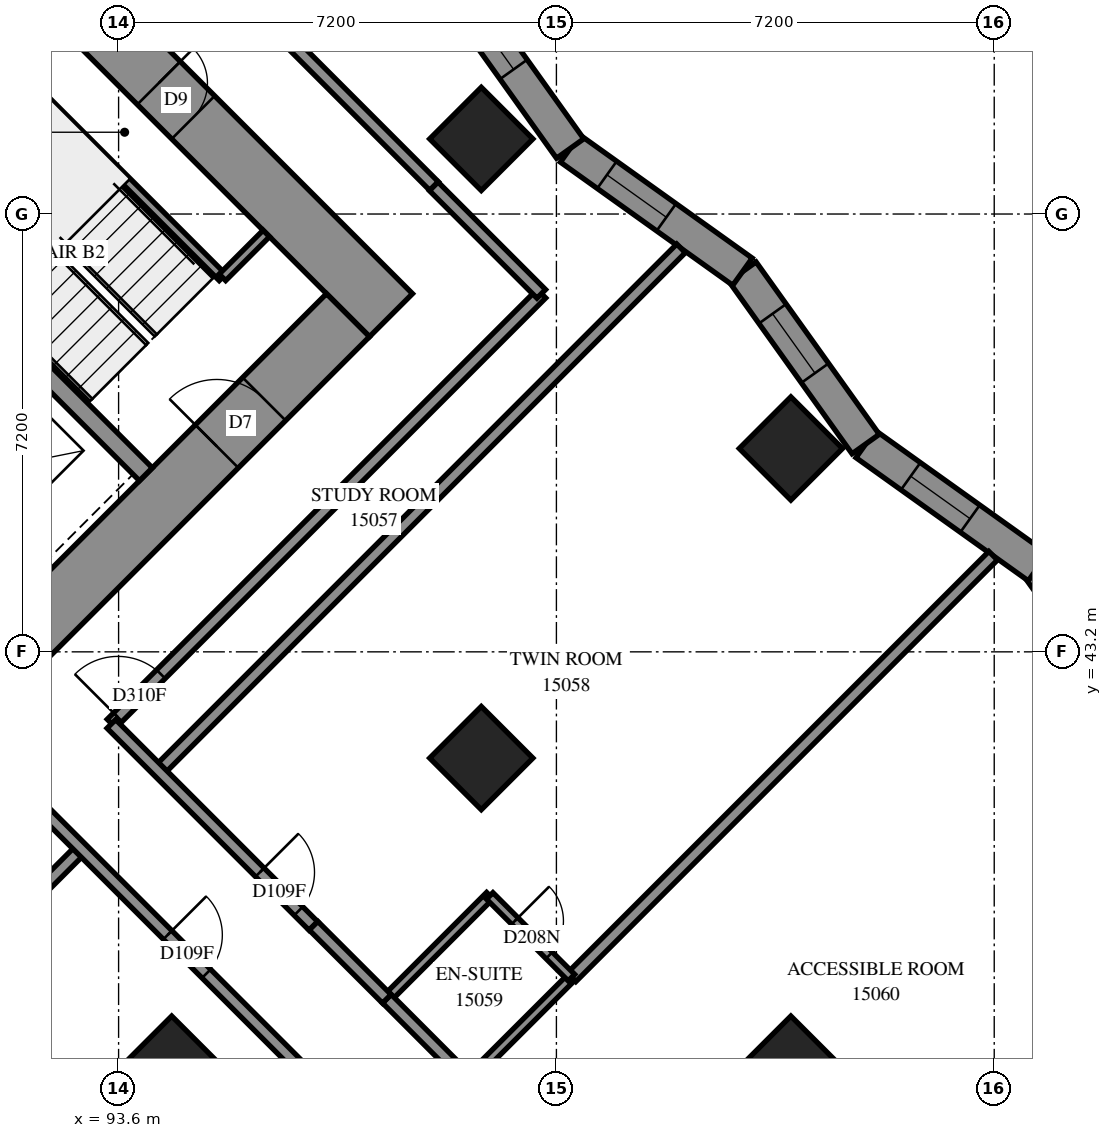
"""IFC4 building model, lengths in metres.
Left out: names, types, materials, properties, quantities, classifications, styles, units other than length and angle.
Written with IfcOpenShell. Run it as: python <this file> out.ifc"""

import sys

from ifc_helpers import new_model, si_unit, direction, frame, frame_2d, origin, origin_2d, place, context, subcontext, project, spatial, polyline, rectangle, outline, extrude, element, fill, save


model = new_model("IFC4")
c1 = context("Model", 3, precision=1e-05, world=origin(), true_north=direction((0.0, 1.0)))
c2 = subcontext(c1, "Body", "Model", "MODEL_VIEW")
j1 = project(units=[si_unit("LENGTHUNIT", "METRE"), si_unit("PLANEANGLEUNIT", "RADIAN")], contexts=[c1])
p1 = place(None, origin())
s1 = spatial("IfcSite", under=j1, at=p1, CompositionType="ELEMENT")
p2 = place(p1, origin())
s2 = spatial("IfcBuilding", under=s1, at=p2, CompositionType="ELEMENT")
p3 = place(p2, frame((0.0, 0.0, 57.6)))
s3 = spatial("IfcBuildingStorey", under=s2, at=p3, CompositionType="ELEMENT", Elevation=57.6)
for number, where, z_axis, x_axis in (
    (1, (99.565, 51.635, 0.0), (0.0, 0.0, 1.0), (0.707, -0.707, 0.0)),
    (2, (104.656, 46.544, 0.0), (0.0, 0.0, 1.0), (0.707, -0.707, 0.0)),
    (3, (99.565, 41.453, 0.0), (0.0, 0.0, 1.0), (0.707, -0.707, 0.0)),
    (4, (94.474, 36.362, 0.0), (0.0, 0.0, 1.0), (0.707, -0.707, 0.0)),
    (5, (104.656, 36.362, 0.0), (0.0, 0.0, 1.0), (0.707, -0.707, 0.0)),
):
    element("IfcColumn", number, at=place(p3, frame(where, z_axis=z_axis, x_axis=x_axis)), inside=s3, PredefinedType="COLUMN", context=c2, shape_type="SweptSolid", body=[
        extrude(rectangle(XDim=1.2, YDim=1.2, at=origin_2d()), origin(), (0.0, 0.0, 1.0), 3.1),
    ])
p4 = place(p3, frame((86.483, 60.333, -0.3), z_axis=(0.0, 0.0, 1.0), x_axis=(0.70710983, -0.7071037324, 0.0)))
e6 = element("IfcWall", 6, at=p4, inside=s3, PredefinedType="SHEAR", context=c2, shape_type="SweptSolid", body=[
    extrude(rectangle(XDim=16.4, YDim=1.0, at=frame_2d((8.2, 0.0))), origin(), (0.0, 0.0, 1.0), 2.7),
])
p5 = place(p4, frame((11.0, 0.0, 0.3)))
e7 = element("IfcOpeningElement", 7, at=p5, cuts=e6, PredefinedType="OPENING", context=c2, shape_type="SweptSolid", body=[
    extrude(rectangle(XDim=0.8, YDim=2.1, at=frame_2d((0.4, 1.05))), frame((0.0, 0.51, 0.0), z_axis=(0.0, -1.0, 0.0), x_axis=(1.0, 0.0, 0.0)), (0.0, 0.0, 1.0), 1.02),
])
p6 = place(p3, frame((87.19, 38.554, -0.3), z_axis=(0.0, 0.0, 1.0), x_axis=(0.707103309, 0.7071102534, 0.0)))
e8 = element("IfcWall", 8, at=p6, inside=s3, PredefinedType="SHEAR", context=c2, shape_type="SweptSolid", body=[
    extrude(rectangle(XDim=14.4, YDim=1.0, at=frame_2d((7.2, 0.0))), origin(), (0.0, 0.0, 1.0), 2.7),
])
p7 = place(p6, frame((4.55, 0.0, 0.3)))
e9 = element("IfcOpeningElement", 9, at=p7, cuts=e8, PredefinedType="OPENING", context=c2, shape_type="SweptSolid", body=[
    extrude(rectangle(XDim=1.1, YDim=2.1, at=frame_2d((0.55, 1.05))), frame((0.0, 0.51, 0.0), z_axis=(0.0, -1.0, 0.0), x_axis=(1.0, 0.0, 0.0)), (0.0, 0.0, 1.0), 1.02),
])
p8 = place(p6, frame((11.35, 0.0, 0.3)))
e10 = element("IfcOpeningElement", 10, at=p8, cuts=e8, PredefinedType="OPENING", context=c2, shape_type="SweptSolid", body=[
    extrude(rectangle(XDim=1.1, YDim=2.1, at=frame_2d((0.55, 1.05))), frame((0.0, 0.51, 0.0), z_axis=(0.0, -1.0, 0.0), x_axis=(1.0, 0.0, 0.0)), (0.0, 0.0, 1.0), 1.02),
])
p9 = place(p3, frame((88.958, 51.211, 0.0), z_axis=(0.0, 0.0, 1.0), x_axis=(0.7070998367, -0.7071137256, 0.0)))
e11 = element("IfcWall", 11, at=p9, inside=s3, PredefinedType="SOLIDWALL", context=c2, shape_type="SweptSolid", body=[
    extrude(rectangle(XDim=7.2, YDim=0.3, at=frame_2d((3.6, 0.0))), origin(), (0.0, 0.0, 1.0), 3.1),
])
p10 = place(p3, frame((110.745, 41.757, 0.0), z_axis=(0.0, 0.0, 1.0), x_axis=(-0.5813956737, 0.8136209625, 0.0)))
e12 = element("IfcWall", 12, at=p10, inside=s3, PredefinedType="SOLIDWALL", context=c2, shape_type="SweptSolid", body=[
    extrude(outline(polyline([(0.046, -0.275), (3.53, -0.275), (3.438, 0.275), (-0.046, 0.275), (0.046, -0.275)])), origin(), (0.0, 0.0, 1.0), 3.1),
])
p11 = place(p10, frame((1.268, 0.0, 0.5)))
e13 = element("IfcOpeningElement", 13, at=p11, cuts=e12, PredefinedType="OPENING", context=c2, shape_type="SweptSolid", body=[
    extrude(rectangle(XDim=1.2, YDim=2.45, at=frame_2d((0.6, 1.225))), frame((0.0, 0.285, 0.0), z_axis=(0.0, -1.0, 0.0), x_axis=(1.0, 0.0, 0.0)), (0.0, 0.0, 1.0), 0.57),
])
p12 = place(p3, frame((108.72, 44.592, 0.0), z_axis=(0.0, 0.0, 1.0), x_axis=(-0.8136209625, 0.5813956737, 0.0)))
e14 = element("IfcWall", 14, at=p12, inside=s3, PredefinedType="SOLIDWALL", context=c2, shape_type="SweptSolid", body=[
    extrude(outline(polyline([(-0.046, -0.275), (3.438, -0.275), (3.53, 0.275), (0.046, 0.275), (-0.046, -0.275)])), origin(), (0.0, 0.0, 1.0), 3.1),
])
p13 = place(p12, frame((1.373, 0.0, 0.5)))
e15 = element("IfcOpeningElement", 15, at=p13, cuts=e14, PredefinedType="OPENING", context=c2, shape_type="SweptSolid", body=[
    extrude(rectangle(XDim=1.2, YDim=2.45, at=frame_2d((0.6, 1.225))), frame((0.0, 0.285, 0.0), z_axis=(0.0, -1.0, 0.0), x_axis=(1.0, 0.0, 0.0)), (0.0, 0.0, 1.0), 0.57),
])
p14 = place(p3, frame((105.886, 46.617, 0.0), z_axis=(0.0, 0.0, 1.0), x_axis=(-0.5813956737, 0.8136209625, 0.0)))
e16 = element("IfcWall", 16, at=p14, inside=s3, PredefinedType="SOLIDWALL", context=c2, shape_type="SweptSolid", body=[
    extrude(outline(polyline([(0.046, -0.275), (3.53, -0.275), (3.438, 0.275), (-0.046, 0.275), (0.046, -0.275)])), origin(), (0.0, 0.0, 1.0), 3.1),
])
p15 = place(p14, frame((1.434, 0.0, 0.5)))
e17 = element("IfcOpeningElement", 17, at=p15, cuts=e16, PredefinedType="OPENING", context=c2, shape_type="SweptSolid", body=[
    extrude(rectangle(XDim=1.2, YDim=2.45, at=frame_2d((0.6, 1.225))), frame((0.0, 0.285, 0.0), z_axis=(0.0, -1.0, 0.0), x_axis=(1.0, 0.0, 0.0)), (0.0, 0.0, 1.0), 0.57),
])
p16 = place(p3, frame((103.86, 49.452, 0.0), z_axis=(0.0, 0.0, 1.0), x_axis=(-0.8136209625, 0.5813956737, 0.0)))
e18 = element("IfcWall", 18, at=p16, inside=s3, PredefinedType="SOLIDWALL", context=c2, shape_type="SweptSolid", body=[
    extrude(outline(polyline([(-0.046, -0.275), (3.438, -0.275), (3.53, 0.275), (0.046, 0.275), (-0.046, -0.275)])), origin(), (0.0, 0.0, 1.0), 3.1),
])
p17 = place(p16, frame((1.539, 0.0, 0.5)))
e19 = element("IfcOpeningElement", 19, at=p17, cuts=e18, PredefinedType="OPENING", context=c2, shape_type="SweptSolid", body=[
    extrude(rectangle(XDim=1.2, YDim=2.45, at=frame_2d((0.6, 1.225))), frame((0.0, 0.285, 0.0), z_axis=(0.0, -1.0, 0.0), x_axis=(1.0, 0.0, 0.0)), (0.0, 0.0, 1.0), 0.57),
])
p18 = place(p3, frame((101.026, 51.477, 0.0), z_axis=(0.0, 0.0, 1.0), x_axis=(-0.5813956737, 0.8136209625, 0.0)))
e20 = element("IfcWall", 20, at=p18, inside=s3, PredefinedType="SOLIDWALL", context=c2, shape_type="SweptSolid", body=[
    extrude(outline(polyline([(0.046, -0.275), (3.53, -0.275), (3.438, 0.275), (-0.046, 0.275), (0.046, -0.275)])), origin(), (0.0, 0.0, 1.0), 3.1),
])
p19 = place(p18, frame((1.599, 0.0, 0.5)))
e21 = element("IfcOpeningElement", 21, at=p19, cuts=e20, PredefinedType="OPENING", context=c2, shape_type="SweptSolid", body=[
    extrude(rectangle(XDim=1.2, YDim=2.45, at=frame_2d((0.6, 1.225))), frame((0.0, 0.285, 0.0), z_axis=(0.0, -1.0, 0.0), x_axis=(1.0, 0.0, 0.0)), (0.0, 0.0, 1.0), 0.57),
])
p20 = place(p3, frame((91.313, 53.354, 0.0), z_axis=(0.0, 0.0, 1.0), x_axis=(0.7071067812, -0.7071067812, 0.0)))
e22 = element("IfcWall", 22, at=p20, inside=s3, PredefinedType="PARTITIONING", context=c2, shape_type="SweptSolid", body=[
    extrude(rectangle(XDim=5.65, YDim=0.15, at=frame_2d((2.825, 0.0))), origin(), (0.0, 0.0, 1.0), 3.1),
])
p21 = place(p3, frame((95.308, 49.358, 0.0), z_axis=(0.0, 0.0, 1.0), x_axis=(0.70705776, 0.707155799, 0.0)))
e23 = element("IfcWall", 23, at=p21, inside=s3, PredefinedType="PARTITIONING", context=c2, shape_type="SweptSolid", body=[
    extrude(rectangle(XDim=1.02, YDim=0.15, at=frame_2d((0.51, 0.0))), origin(), (0.0, 0.0, 1.0), 3.1),
])
p22 = place(p3, frame((94.259, 41.243, 0.0), z_axis=(0.0, 0.0, 1.0), x_axis=(0.7070203602, 0.7071931916, 0.0)))
e24 = element("IfcWall", 24, at=p22, inside=s3, PredefinedType="PARTITIONING", context=c2, shape_type="SweptSolid", body=[
    extrude(rectangle(XDim=12.151, YDim=0.2, at=frame_2d((6.075, 0.0))), origin(), (0.0, 0.0, 1.0), 3.1),
])
p23 = place(p3, frame((93.484, 42.02, 0.0), z_axis=(0.0, 0.0, 1.0), x_axis=(0.7071067812, 0.7071067812, 0.0)))
e25 = element("IfcWall", 25, at=p23, inside=s3, PredefinedType="PARTITIONING", context=c2, shape_type="SweptSolid", body=[
    extrude(rectangle(XDim=9.998, YDim=0.2, at=frame_2d((4.999, 0.0))), origin(), (0.0, 0.0, 1.0), 3.1),
])
p24 = place(p23, frame((0.148, 0.0, 0.0)))
e26 = element("IfcOpeningElement", 26, at=p24, cuts=e25, PredefinedType="OPENING", context=c2, shape_type="SweptSolid", body=[
    extrude(rectangle(XDim=1.0, YDim=2.1, at=frame_2d((0.5, 1.05))), frame((0.0, 0.11, 0.0), z_axis=(0.0, -1.0, 0.0), x_axis=(1.0, 0.0, 0.0)), (0.0, 0.0, 1.0), 0.22),
])
p25 = place(p3, frame((106.14, 32.756, 0.0), z_axis=(0.0, 0.0, 1.0), x_axis=(0.7071067812, 0.7071067812, 0.0)))
e27 = element("IfcWall", 27, at=p25, inside=s3, PredefinedType="PARTITIONING", context=c2, shape_type="SweptSolid", body=[
    extrude(rectangle(XDim=9.86, YDim=0.2, at=frame_2d((4.93, 0.0))), origin(), (0.0, 0.0, 1.0), 3.1),
])
p26 = place(p3, frame((101.049, 37.847, 0.0), z_axis=(0.0, 0.0, 1.0), x_axis=(0.7071067812, 0.7071067812, 0.0)))
e28 = element("IfcWall", 28, at=p26, inside=s3, PredefinedType="PARTITIONING", context=c2, shape_type="SweptSolid", body=[
    extrude(rectangle(XDim=9.806, YDim=0.2, at=frame_2d((4.903, 0.0))), origin(), (0.0, 0.0, 1.0), 3.1),
])
p27 = place(p3, frame((86.314, 33.285, 0.0), z_axis=(0.0, 0.0, 1.0), x_axis=(0.7069956063, 0.7072179386, 0.0)))
e29 = element("IfcWall", 29, at=p27, inside=s3, PredefinedType="PARTITIONING", context=c2, shape_type="SweptSolid", body=[
    extrude(rectangle(XDim=9.445, YDim=0.2, at=frame_2d((4.723, 0.0))), origin(), (0.0, 0.0, 1.0), 3.1),
])
p28 = place(p3, frame((92.349, 40.601, 0.0), z_axis=(0.0, 0.0, 1.0), x_axis=(0.7071067812, -0.7071067812, 0.0)))
e30 = element("IfcWall", 30, at=p28, inside=s3, PredefinedType="PARTITIONING", context=c2, shape_type="SweptSolid", body=[
    extrude(rectangle(XDim=8.101, YDim=0.2, at=frame_2d((4.05, 0.0))), origin(), (0.0, 0.0, 1.0), 3.1),
])
p29 = place(p28, frame((2.909, 0.0, 0.0)))
e31 = element("IfcOpeningElement", 31, at=p29, cuts=e30, PredefinedType="OPENING", context=c2, shape_type="SweptSolid", body=[
    extrude(rectangle(XDim=0.9, YDim=2.1, at=frame_2d((0.45, 1.05))), frame((0.0, 0.11, 0.0), z_axis=(0.0, -1.0, 0.0), x_axis=(1.0, 0.0, 0.0)), (0.0, 0.0, 1.0), 0.22),
])
p30 = place(p3, frame((93.481, 42.015, 0.0), z_axis=(0.0, 0.0, 1.0), x_axis=(0.7071067812, -0.7071067812, 0.0)))
e32 = element("IfcWall", 32, at=p30, inside=s3, PredefinedType="PARTITIONING", context=c2, shape_type="SweptSolid", body=[
    extrude(rectangle(XDim=4.698, YDim=0.2, at=frame_2d((2.349, 0.0))), origin(), (0.0, 0.0, 1.0), 3.1),
])
p31 = place(p30, frame((3.452, 0.0, 0.0)))
e33 = element("IfcOpeningElement", 33, at=p31, cuts=e32, PredefinedType="OPENING", context=c2, shape_type="SweptSolid", body=[
    extrude(rectangle(XDim=0.9, YDim=2.1, at=frame_2d((0.45, 1.05))), frame((0.0, 0.11, 0.0), z_axis=(0.0, -1.0, 0.0), x_axis=(1.0, 0.0, 0.0)), (0.0, 0.0, 1.0), 0.22),
])
p32 = place(p3, frame((96.244, 53.406, 0.0), z_axis=(0.0, 0.0, 1.0), x_axis=(0.7068288851, -0.7073845681, 0.0)))
e34 = element("IfcWall", 34, at=p32, inside=s3, PredefinedType="PARTITIONING", context=c2, shape_type="SweptSolid", body=[
    extrude(rectangle(XDim=3.599, YDim=0.2, at=frame_2d((1.8, 0.0))), origin(), (0.0, 0.0, 1.0), 3.1),
])
p33 = place(p3, frame((98.783, 50.855, 0.0), z_axis=(0.0, 0.0, 1.0), x_axis=(0.7071067812, -0.7071067812, 0.0)))
e35 = element("IfcWall", 35, at=p33, inside=s3, PredefinedType="PARTITIONING", context=c2, shape_type="SweptSolid", body=[
    extrude(rectangle(XDim=2.5, YDim=0.2, at=frame_2d((1.25, 0.0))), origin(), (0.0, 0.0, 1.0), 3.1),
])
p34 = place(p3, frame((99.349, 36.153, 0.0), z_axis=(0.0, 0.0, 1.0), x_axis=(0.7075233388, 0.706689978, 0.0)))
e36 = element("IfcWall", 36, at=p34, inside=s3, PredefinedType="PARTITIONING", context=c2, shape_type="SweptSolid", body=[
    extrude(rectangle(XDim=2.4, YDim=0.15, at=frame_2d((1.2, 0.0))), origin(), (0.0, 0.0, 1.0), 3.1),
])
p35 = place(p3, frame((98.009, 37.495, 0.0), z_axis=(0.0, 0.0, 1.0), x_axis=(0.7071067812, 0.7071067812, 0.0)))
e37 = element("IfcWall", 37, at=p35, inside=s3, PredefinedType="PARTITIONING", context=c2, shape_type="SweptSolid", body=[
    extrude(rectangle(XDim=2.398, YDim=0.15, at=frame_2d((1.199, 0.0))), origin(), (0.0, 0.0, 1.0), 3.1),
])
p36 = place(p3, frame((99.703, 39.187, 0.0), z_axis=(0.0, 0.0, 1.0), x_axis=(0.7071067812, -0.7071067812, 0.0)))
e38 = element("IfcWall", 38, at=p36, inside=s3, PredefinedType="PARTITIONING", context=c2, shape_type="SweptSolid", body=[
    extrude(rectangle(XDim=1.901, YDim=0.15, at=frame_2d((0.95, 0.0))), origin(), (0.0, 0.0, 1.0), 3.1),
])
p37 = place(p36, frame((0.584, 0.0, 0.0)))
e39 = element("IfcOpeningElement", 39, at=p37, cuts=e38, PredefinedType="OPENING", context=c2, shape_type="SweptSolid", body=[
    extrude(rectangle(XDim=0.8, YDim=2.1, at=frame_2d((0.4, 1.05))), frame((0.0, 0.085, 0.0), z_axis=(0.0, -1.0, 0.0), x_axis=(1.0, 0.0, 0.0)), (0.0, 0.0, 1.0), 0.17),
])
p38 = place(p3, frame((98.012, 37.496, 0.0), z_axis=(0.0, 0.0, 1.0), x_axis=(0.7065800724, -0.7076330979, 0.0)))
e40 = element("IfcWall", 40, at=p38, inside=s3, PredefinedType="PARTITIONING", context=c2, shape_type="SweptSolid", body=[
    extrude(rectangle(XDim=1.899, YDim=0.2, at=frame_2d((0.95, 0.0))), origin(), (0.0, 0.0, 1.0), 3.1),
])
p39 = place(p3, frame((96.806, 38.696, 0.0), z_axis=(0.0, 0.0, 1.0), x_axis=(0.7076943229, -0.7065187509, 0.0)))
e41 = element("IfcWall", 41, at=p39, inside=s3, PredefinedType="PARTITIONING", context=c2, shape_type="SweptSolid", body=[
    extrude(rectangle(XDim=1.701, YDim=0.2, at=frame_2d((0.851, 0.0))), origin(), (0.0, 0.0, 1.0), 3.1),
])
p40 = place(p13, origin())
e42 = element("IfcWindow", 42, at=p40, inside=s3, PartitioningType="SINGLE_PANEL", PredefinedType="WINDOW", context=c2, shape_type="SweptSolid", body=[
    extrude(rectangle(XDim=1.2, YDim=2.45, at=frame_2d((0.6, 1.225))), frame((0.0, 0.155, 0.0), z_axis=(0.0, -1.0, 0.0), x_axis=(1.0, 0.0, 0.0)), (0.0, 0.0, 1.0), 0.06),
])
fill(e15, e42)
p41 = place(p15, origin())
e43 = element("IfcWindow", 43, at=p41, inside=s3, PartitioningType="SINGLE_PANEL", PredefinedType="WINDOW", context=c2, shape_type="SweptSolid", body=[
    extrude(rectangle(XDim=1.2, YDim=2.45, at=frame_2d((0.6, 1.225))), frame((0.0, 0.155, 0.0), z_axis=(0.0, -1.0, 0.0), x_axis=(1.0, 0.0, 0.0)), (0.0, 0.0, 1.0), 0.06),
])
fill(e17, e43)
p42 = place(p17, origin())
e44 = element("IfcWindow", 44, at=p42, inside=s3, PartitioningType="SINGLE_PANEL", PredefinedType="WINDOW", context=c2, shape_type="SweptSolid", body=[
    extrude(rectangle(XDim=1.2, YDim=2.45, at=frame_2d((0.6, 1.225))), frame((0.0, 0.155, 0.0), z_axis=(0.0, -1.0, 0.0), x_axis=(1.0, 0.0, 0.0)), (0.0, 0.0, 1.0), 0.06),
])
fill(e19, e44)
p43 = place(p19, origin())
e45 = element("IfcWindow", 45, at=p43, inside=s3, PartitioningType="SINGLE_PANEL", PredefinedType="WINDOW", context=c2, shape_type="SweptSolid", body=[
    extrude(rectangle(XDim=1.2, YDim=2.45, at=frame_2d((0.6, 1.225))), frame((0.0, 0.155, 0.0), z_axis=(0.0, -1.0, 0.0), x_axis=(1.0, 0.0, 0.0)), (0.0, 0.0, 1.0), 0.06),
])
fill(e21, e45)
p44 = place(p5, origin())
e46 = element("IfcDoor", 46, at=p44, inside=s3, OperationType="SINGLE_SWING_RIGHT", PredefinedType="DOOR", context=c2, shape_type="SweptSolid", body=[
    extrude(rectangle(XDim=0.8, YDim=2.1, at=frame_2d((0.4, 1.05))), frame((0.0, -0.44, 0.0), z_axis=(0.0, -1.0, 0.0), x_axis=(1.0, 0.0, 0.0)), (0.0, 0.0, 1.0), 0.05),
])
fill(e7, e46)
p45 = place(p8, origin())
e47 = element("IfcDoor", 47, at=p45, inside=s3, OperationType="SINGLE_SWING_RIGHT", PredefinedType="DOOR", context=c2, shape_type="SweptSolid", body=[
    extrude(rectangle(XDim=1.1, YDim=2.1, at=frame_2d((0.55, 1.05))), frame((0.0, 0.025, 0.0), z_axis=(0.0, -1.0, 0.0), x_axis=(1.0, 0.0, 0.0)), (0.0, 0.0, 1.0), 0.05),
])
fill(e10, e47)
p46 = place(p24, origin())
e48 = element("IfcDoor", 48, at=p46, inside=s3, OperationType="SINGLE_SWING_LEFT", PredefinedType="DOOR", context=c2, shape_type="SweptSolid", body=[
    extrude(rectangle(XDim=1.0, YDim=2.1, at=frame_2d((0.5, 1.05))), frame((0.0, 0.025, 0.0), z_axis=(0.0, -1.0, 0.0), x_axis=(1.0, 0.0, 0.0)), (0.0, 0.0, 1.0), 0.05),
])
fill(e26, e48)
p47 = place(p31, origin())
e49 = element("IfcDoor", 49, at=p47, inside=s3, OperationType="SINGLE_SWING_RIGHT", PredefinedType="DOOR", context=c2, shape_type="SweptSolid", body=[
    extrude(rectangle(XDim=0.9, YDim=2.1, at=frame_2d((0.45, 1.05))), frame((0.0, 0.025, 0.0), z_axis=(0.0, -1.0, 0.0), x_axis=(1.0, 0.0, 0.0)), (0.0, 0.0, 1.0), 0.05),
])
fill(e33, e49)
p48 = place(p37, origin())
e50 = element("IfcDoor", 50, at=p48, inside=s3, OperationType="SINGLE_SWING_RIGHT", PredefinedType="DOOR", context=c2, shape_type="SweptSolid", body=[
    extrude(rectangle(XDim=0.8, YDim=2.1, at=frame_2d((0.4, 1.05))), frame((0.0, 0.025, 0.0), z_axis=(0.0, -1.0, 0.0), x_axis=(1.0, 0.0, 0.0)), (0.0, 0.0, 1.0), 0.05),
])
fill(e39, e50)
p49 = place(p29, origin())
e51 = element("IfcDoor", 51, at=p49, inside=s3, OperationType="SINGLE_SWING_LEFT", PredefinedType="DOOR", context=c2, shape_type="SweptSolid", body=[
    extrude(rectangle(XDim=0.9, YDim=2.1, at=frame_2d((0.45, 1.05))), frame((0.0, 0.025, 0.0), z_axis=(0.0, -1.0, 0.0), x_axis=(1.0, 0.0, 0.0)), (0.0, 0.0, 1.0), 0.05),
])
fill(e31, e51)
save(model, sys.argv[1])
